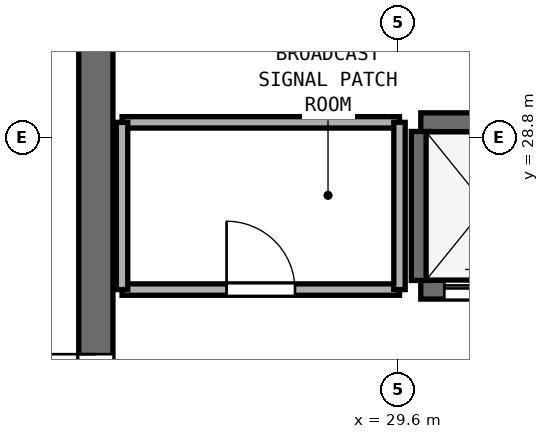
"""IFC4 building model, lengths in metres.
Left out: names, types, materials, properties, quantities, classifications, styles, units other than length and angle.
Written with IfcOpenShell. Run it as: python <this file> out.ifc"""

import sys

from ifc_helpers import new_model, si_unit, direction, frame, frame_2d, origin, place, context, subcontext, project, spatial, rectangle, extrude, element, fill, save


model = new_model("IFC4")
c1 = context("Model", 3, precision=1e-05, world=origin(), true_north=direction((0.0, 1.0)))
c2 = subcontext(c1, "Body", "Model", "MODEL_VIEW")
j1 = project(units=[si_unit("LENGTHUNIT", "METRE"), si_unit("PLANEANGLEUNIT", "RADIAN")], contexts=[c1])
p1 = place(None, origin())
s1 = spatial("IfcSite", under=j1, at=p1, CompositionType="ELEMENT")
p2 = place(p1, origin())
s2 = spatial("IfcBuilding", under=s1, at=p2, CompositionType="ELEMENT")
p3 = place(p2, frame((0.0, 0.0, 301.0)))
s3 = spatial("IfcBuildingStorey", under=s2, at=p3, CompositionType="ELEMENT", Elevation=301.0)
p4 = place(p3, frame((25.625, 17.45, 0.0), z_axis=(0.0, 0.0, 1.0), x_axis=(0.0, 1.0, 0.0)))
e1 = element("IfcWall", 1, at=p4, inside=s3, PredefinedType="SHEAR", context=c2, shape_type="SweptSolid", body=[
    extrude(rectangle(XDim=15.5, YDim=0.45, at=frame_2d((7.75, 0.0))), origin(), (0.0, 0.0, 1.0), 3.54),
])
p5 = place(p4, frame((7.0, 0.0, 0.0)))
e2 = element("IfcOpeningElement", 2, at=p5, cuts=e1, PredefinedType="OPENING", context=c2, shape_type="SweptSolid", body=[
    extrude(rectangle(XDim=1.5, YDim=2.15, at=frame_2d((0.75, 1.075))), frame((0.0, 0.235, 0.0), z_axis=(0.0, -1.0, 0.0), x_axis=(1.0, 0.0, 0.0)), (0.0, 0.0, 1.0), 0.47),
])
p6 = place(p3, frame((29.9, 26.8, 0.0), z_axis=(0.0, 0.0, 1.0), x_axis=(1.0, 0.0, 0.0)))
e3 = element("IfcWall", 3, at=p6, inside=s3, PredefinedType="SHEAR", context=c2, shape_type="SweptSolid", body=[
    extrude(rectangle(XDim=1.72, YDim=0.25, at=frame_2d((0.86, 0.0))), origin(), (0.0, 0.0, 1.0), 3.54),
])
p7 = place(p6, frame((0.31, 0.0, 0.0)))
e4 = element("IfcOpeningElement", 4, at=p7, cuts=e3, PredefinedType="OPENING", context=c2, shape_type="SweptSolid", body=[
    extrude(rectangle(XDim=1.1, YDim=2.15, at=frame_2d((0.55, 1.075))), frame((0.0, 0.135, 0.0), z_axis=(0.0, -1.0, 0.0), x_axis=(1.0, 0.0, 0.0)), (0.0, 0.0, 1.0), 0.27),
])
p8 = place(p3, frame((29.9, 29.0, 0.0), z_axis=(0.0, 0.0, 1.0), x_axis=(1.0, 0.0, 0.0)))
e5 = element("IfcWall", 5, at=p8, inside=s3, PredefinedType="SHEAR", context=c2, shape_type="SweptSolid", body=[
    extrude(rectangle(XDim=1.72, YDim=0.25, at=frame_2d((0.86, 0.0))), origin(), (0.0, 0.0, 1.0), 3.54),
])
p9 = place(p3, frame((29.9, 26.92, 0.0), z_axis=(0.0, 0.0, 1.0), x_axis=(0.0, 1.0, 0.0)))
e6 = element("IfcWall", 6, at=p9, inside=s3, PredefinedType="SHEAR", context=c2, shape_type="SweptSolid", body=[
    extrude(rectangle(XDim=1.96, YDim=0.25, at=frame_2d((0.98, 0.0))), origin(), (0.0, 0.0, 1.0), 3.54),
])
p10 = place(p3, frame((25.97, 26.8, 0.0), z_axis=(0.0, 0.0, 1.0), x_axis=(1.0, 0.0, 0.0)))
e7 = element("IfcWall", 7, at=p10, inside=s3, PredefinedType="PARTITIONING", context=c2, shape_type="SweptSolid", body=[
    extrude(rectangle(XDim=3.65, YDim=0.15, at=frame_2d((1.825, 0.0))), origin(), (0.0, 0.0, 1.0), 3.54),
])
p11 = place(p10, frame((1.375, 0.0, 0.0)))
e8 = element("IfcOpeningElement", 8, at=p11, cuts=e7, PredefinedType="OPENING", context=c2, shape_type="SweptSolid", body=[
    extrude(rectangle(XDim=0.9, YDim=2.1, at=frame_2d((0.45, 1.05))), frame((0.0, 0.085, 0.0), z_axis=(0.0, -1.0, 0.0), x_axis=(1.0, 0.0, 0.0)), (0.0, 0.0, 1.0), 0.17),
])
p12 = place(p3, frame((25.97, 29.0, 0.0), z_axis=(0.0, 0.0, 1.0), x_axis=(1.0, 0.0, 0.0)))
e9 = element("IfcWall", 9, at=p12, inside=s3, PredefinedType="PARTITIONING", context=c2, shape_type="SweptSolid", body=[
    extrude(rectangle(XDim=3.65, YDim=0.15, at=frame_2d((1.825, 0.0))), origin(), (0.0, 0.0, 1.0), 3.54),
])
p13 = place(p3, frame((25.97, 26.8, 0.0), z_axis=(0.0, 0.0, 1.0), x_axis=(0.0, 1.0, 0.0)))
e10 = element("IfcWall", 10, at=p13, inside=s3, PredefinedType="PARTITIONING", context=c2, shape_type="SweptSolid", body=[
    extrude(rectangle(XDim=2.2, YDim=0.15, at=frame_2d((1.1, 0.0))), origin(), (0.0, 0.0, 1.0), 2.64),
])
p14 = place(p3, frame((29.62, 26.8, 0.0), z_axis=(0.0, 0.0, 1.0), x_axis=(0.0, 1.0, 0.0)))
e11 = element("IfcWall", 11, at=p14, inside=s3, PredefinedType="PARTITIONING", context=c2, shape_type="SweptSolid", body=[
    extrude(rectangle(XDim=2.2, YDim=0.15, at=frame_2d((1.1, 0.0))), origin(), (0.0, 0.0, 1.0), 3.54),
])
p15 = place(p7, origin())
e12 = element("IfcDoor", 12, at=p15, inside=s3, OperationType="DOUBLE_DOOR_SLIDING", PredefinedType="DOOR", context=c2, shape_type="SweptSolid", body=[
    extrude(rectangle(XDim=1.1, YDim=2.15, at=frame_2d((0.55, 1.075))), frame((0.0, 0.025, 0.0), z_axis=(0.0, -1.0, 0.0), x_axis=(1.0, 0.0, 0.0)), (0.0, 0.0, 1.0), 0.05),
])
fill(e4, e12)
p16 = place(p5, origin())
e13 = element("IfcDoor", 13, at=p16, inside=s3, OperationType="DOUBLE_DOOR_SINGLE_SWING", PredefinedType="DOOR", context=c2, shape_type="SweptSolid", body=[
    extrude(rectangle(XDim=1.5, YDim=2.15, at=frame_2d((0.75, 1.075))), frame((0.0, 0.025, 0.0), z_axis=(0.0, -1.0, 0.0), x_axis=(1.0, 0.0, 0.0)), (0.0, 0.0, 1.0), 0.05),
])
fill(e2, e13)
p17 = place(p11, origin())
e14 = element("IfcDoor", 14, at=p17, inside=s3, OperationType="SINGLE_SWING_LEFT", PredefinedType="DOOR", context=c2, shape_type="SweptSolid", body=[
    extrude(rectangle(XDim=0.9, YDim=2.1, at=frame_2d((0.45, 1.05))), frame((0.0, 0.025, 0.0), z_axis=(0.0, -1.0, 0.0), x_axis=(1.0, 0.0, 0.0)), (0.0, 0.0, 1.0), 0.05),
])
fill(e8, e14)
save(model, sys.argv[1])
